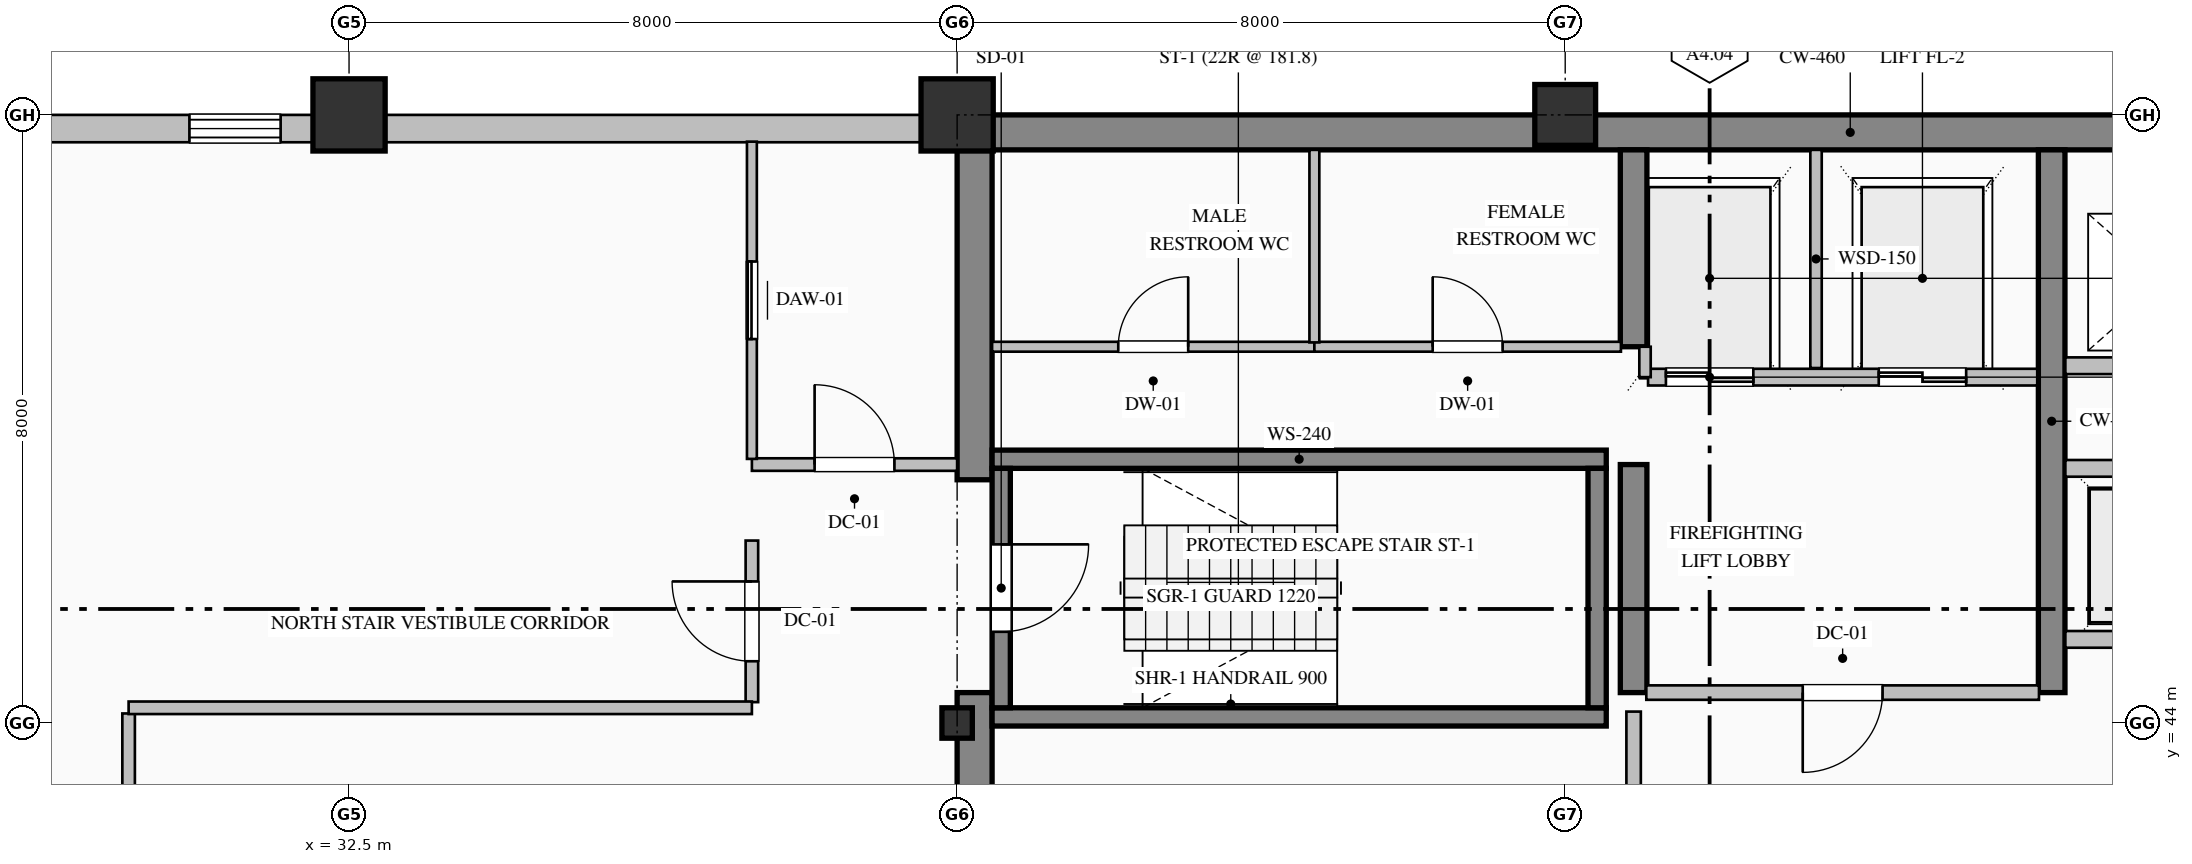
"""IFC4 building model, lengths in metres.
Left out: names, types, materials, properties, quantities, classifications, styles, units other than length and angle.
Written with IfcOpenShell. Run it as: python <this file> out.ifc"""

import sys

from ifc_helpers import new_model, si_unit, direction, frame, frame_2d, origin, origin_2d, place, context, subcontext, project, spatial, rectangle, hollow_rectangle, i_section, extrude, element, fill, save


model = new_model("IFC4")
c1 = context("Model", 3, precision=1e-05, world=origin(), true_north=direction((0.0, 1.0)))
c2 = subcontext(c1, "Body", "Model", "MODEL_VIEW")
j1 = project(units=[si_unit("LENGTHUNIT", "METRE"), si_unit("PLANEANGLEUNIT", "RADIAN")], contexts=[c1])
p1 = place(None, origin())
s1 = spatial("IfcSite", under=j1, at=p1, CompositionType="ELEMENT")
p2 = place(p1, origin())
s2 = spatial("IfcBuilding", under=s1, at=p2, CompositionType="ELEMENT")
p3 = place(p2, frame((0.0, 0.0, 249.8)))
s3 = spatial("IfcBuildingStorey", under=s2, at=p3, CompositionType="ELEMENT", Elevation=249.8)
p4 = place(p3, frame((40.5, 51.77, 0.0), z_axis=(0.0, 0.0, 1.0), x_axis=(1.0, 0.0, 0.0)))
e1 = element("IfcWall", 1, at=p4, inside=s3, PredefinedType="SHEAR", context=c2, shape_type="SweptSolid", body=[
    extrude(rectangle(XDim=23.5, YDim=0.46, at=frame_2d((11.75, 0.0))), origin(), (0.0, 0.0, 1.0), 3.775),
])
p5 = place(p3, frame((40.73, 36.46, 0.0), z_axis=(0.0, 0.0, 1.0), x_axis=(0.0, 1.0, 0.0)))
e2 = element("IfcWall", 2, at=p5, inside=s3, PredefinedType="SHEAR", context=c2, shape_type="SweptSolid", body=[
    extrude(rectangle(XDim=7.94, YDim=0.46, at=frame_2d((3.97, 0.0))), origin(), (0.0, 0.0, 1.0), 3.775),
])
p6 = place(p3, frame((40.73, 47.2, 0.0), z_axis=(0.0, 0.0, 1.0), x_axis=(0.0, 1.0, 0.0)))
e3 = element("IfcWall", 3, at=p6, inside=s3, PredefinedType="SHEAR", context=c2, shape_type="SweptSolid", body=[
    extrude(rectangle(XDim=4.34, YDim=0.46, at=frame_2d((2.17, 0.0))), origin(), (0.0, 0.0, 1.0), 3.775),
])
p7 = place(p3, frame((49.4, 44.4, 0.0), z_axis=(0.0, 0.0, 1.0), x_axis=(0.0, 1.0, 0.0)))
e4 = element("IfcWall", 4, at=p7, inside=s3, PredefinedType="SHEAR", context=c2, shape_type="SweptSolid", body=[
    extrude(rectangle(XDim=3.0, YDim=0.35, at=frame_2d((1.5, 0.0))), origin(), (0.0, 0.0, 1.0), 3.775),
])
p8 = place(p3, frame((49.4, 48.95, 0.0), z_axis=(0.0, 0.0, 1.0), x_axis=(0.0, 1.0, 0.0)))
e5 = element("IfcWall", 5, at=p8, inside=s3, PredefinedType="SHEAR", context=c2, shape_type="SweptSolid", body=[
    extrude(rectangle(XDim=2.59, YDim=0.35, at=frame_2d((1.295, 0.0))), origin(), (0.0, 0.0, 1.0), 3.775),
])
p9 = place(p3, frame((54.9, 44.4, 0.0), z_axis=(0.0, 0.0, 1.0), x_axis=(0.0, 1.0, 0.0)))
e6 = element("IfcWall", 6, at=p9, inside=s3, PredefinedType="SHEAR", context=c2, shape_type="SweptSolid", body=[
    extrude(rectangle(XDim=7.14, YDim=0.35, at=frame_2d((3.57, 0.0))), origin(), (0.0, 0.0, 1.0), 3.775),
])
p10 = place(p3, frame((32.5, 52.0, 0.0), z_axis=(0.0, 0.0, 1.0), x_axis=(1.0, 0.0, 0.0)))
e7 = element("IfcColumn", 7, at=p10, inside=s3, PredefinedType="COLUMN", context=c2, shape_type="SweptSolid", body=[
    extrude(hollow_rectangle(XDim=0.95, YDim=0.95, WallThickness=0.036, at=origin_2d()), origin(), (0.0, 0.0, 1.0), 4.0),
])
p11 = place(p3, frame((40.5, 44.0, 0.0), z_axis=(0.0, 0.0, 1.0), x_axis=(1.0, 0.0, 0.0)))
e8 = element("IfcColumn", 8, at=p11, inside=s3, PredefinedType="COLUMN", context=c2, shape_type="SweptSolid", body=[
    extrude(i_section(OverallWidth=0.4, OverallDepth=0.4, WebThickness=0.013, FlangeThickness=0.021, FilletRadius=0.022, at=origin_2d()), origin(), (0.0, 0.0, 1.0), 4.0),
])
p12 = place(p3, frame((40.5, 52.0, 0.0), z_axis=(0.0, 0.0, 1.0), x_axis=(1.0, 0.0, 0.0)))
e9 = element("IfcColumn", 9, at=p12, inside=s3, PredefinedType="COLUMN", context=c2, shape_type="SweptSolid", body=[
    extrude(hollow_rectangle(XDim=0.95, YDim=0.95, WallThickness=0.036, at=origin_2d()), origin(), (0.0, 0.0, 1.0), 4.0),
])
p13 = place(p3, frame((48.5, 52.0, 0.0), z_axis=(0.0, 0.0, 1.0), x_axis=(1.0, 0.0, 0.0)))
e10 = element("IfcColumn", 10, at=p13, inside=s3, PredefinedType="COLUMN", context=c2, shape_type="SweptSolid", body=[
    extrude(hollow_rectangle(XDim=0.8, YDim=0.8, WallThickness=0.032, at=origin_2d()), origin(), (0.0, 0.0, 1.0), 4.0),
])
p14 = place(p3, frame((13.0, 51.82, 0.0), z_axis=(0.0, 0.0, 1.0), x_axis=(1.0, 0.0, 0.0)))
e11 = element("IfcWall", 11, at=p14, inside=s3, PredefinedType="SOLIDWALL", context=c2, shape_type="SweptSolid", body=[
    extrude(rectangle(XDim=27.52, YDim=0.36, at=frame_2d((13.76, 0.0))), origin(), (0.0, 0.0, 1.0), 3.325),
])
p15 = place(p14, frame((6.6, 0.0, 0.9)))
e12 = element("IfcOpeningElement", 12, at=p15, cuts=e11, PredefinedType="OPENING", context=c2, shape_type="SweptSolid", body=[
    extrude(rectangle(XDim=1.2, YDim=1.85, at=frame_2d((0.6, 0.925))), frame((0.0, 0.19, 0.0), z_axis=(0.0, -1.0, 0.0), x_axis=(1.0, 0.0, 0.0)), (0.0, 0.0, 1.0), 0.38),
])
p16 = place(p14, frame((17.4, 0.0, 0.9)))
e13 = element("IfcOpeningElement", 13, at=p16, cuts=e11, PredefinedType="OPENING", context=c2, shape_type="SweptSolid", body=[
    extrude(rectangle(XDim=1.2, YDim=1.85, at=frame_2d((0.6, 0.925))), frame((0.0, 0.19, 0.0), z_axis=(0.0, -1.0, 0.0), x_axis=(1.0, 0.0, 0.0)), (0.0, 0.0, 1.0), 0.38),
])
for number, where, z_axis, x_axis in (
    (14, (40.96, 47.47, 0.0), (0.0, 0.0, 1.0), (1.0, 0.0, 0.0)),
    (15, (49.04, 44.08, 0.0), (0.0, 0.0, 1.0), (-1.0, 0.0, 0.0)),
):
    element("IfcWall", number, at=place(p3, frame(where, z_axis=z_axis, x_axis=x_axis)), inside=s3, PredefinedType="SOLIDWALL", context=c2, shape_type="SweptSolid", body=[
        extrude(rectangle(XDim=8.08, YDim=0.24, at=frame_2d((4.04, 0.0))), origin(), (0.0, 0.0, 1.0), 4.0),
    ])
p17 = place(p3, frame((41.08, 47.35, 0.0), z_axis=(0.0, 0.0, 1.0), x_axis=(0.0, -1.0, 0.0)))
e16 = element("IfcWall", 16, at=p17, inside=s3, PredefinedType="SOLIDWALL", context=c2, shape_type="SweptSolid", body=[
    extrude(rectangle(XDim=3.15, YDim=0.24, at=frame_2d((1.575, 0.0))), origin(), (0.0, 0.0, 1.0), 4.0),
])
p18 = place(p17, frame((1.0, 0.0, 0.0)))
e17 = element("IfcOpeningElement", 17, at=p18, cuts=e16, PredefinedType="OPENING", context=c2, shape_type="SweptSolid", body=[
    extrude(rectangle(XDim=1.15, YDim=2.2, at=frame_2d((0.575, 1.1))), frame((0.0, 0.13, 0.0), z_axis=(0.0, -1.0, 0.0), x_axis=(1.0, 0.0, 0.0)), (0.0, 0.0, 1.0), 0.26),
])
p19 = place(p3, frame((48.92, 44.2, 0.0), z_axis=(0.0, 0.0, 1.0), x_axis=(0.0, 1.0, 0.0)))
e18 = element("IfcWall", 18, at=p19, inside=s3, PredefinedType="SOLIDWALL", context=c2, shape_type="SweptSolid", body=[
    extrude(rectangle(XDim=3.15, YDim=0.24, at=frame_2d((1.575, 0.0))), origin(), (0.0, 0.0, 1.0), 4.0),
])
p20 = place(p3, frame((54.71, 48.55, 0.0), z_axis=(0.0, 0.0, 1.0), x_axis=(-1.0, 0.0, 0.0)))
e19 = element("IfcWall", 19, at=p20, inside=s3, PredefinedType="PARTITIONING", context=c2, shape_type="SweptSolid", body=[
    extrude(rectangle(XDim=5.12, YDim=0.22, at=frame_2d((2.56, 0.0))), origin(), (0.0, 0.0, 1.0), 3.775),
])
p21 = place(p20, frame((3.735, 0.0, 0.0)))
e20 = element("IfcOpeningElement", 20, at=p21, cuts=e19, PredefinedType="OPENING", context=c2, shape_type="SweptSolid", body=[
    extrude(rectangle(XDim=1.15, YDim=2.2, at=frame_2d((0.575, 1.1))), frame((0.0, 0.12, 0.0), z_axis=(0.0, -1.0, 0.0), x_axis=(1.0, 0.0, 0.0)), (0.0, 0.0, 1.0), 0.24),
])
p22 = place(p20, frame((0.935, 0.0, 0.0)))
e21 = element("IfcOpeningElement", 21, at=p22, cuts=e19, PredefinedType="OPENING", context=c2, shape_type="SweptSolid", body=[
    extrude(rectangle(XDim=1.15, YDim=2.2, at=frame_2d((0.575, 1.1))), frame((0.0, 0.12, 0.0), z_axis=(0.0, -1.0, 0.0), x_axis=(1.0, 0.0, 0.0)), (0.0, 0.0, 1.0), 0.24),
])
p23 = place(p3, frame((51.8, 48.67, 0.0), z_axis=(0.0, 0.0, 1.0), x_axis=(0.0, 1.0, 0.0)))
e22 = element("IfcWall", 22, at=p23, inside=s3, PredefinedType="PARTITIONING", context=c2, shape_type="SweptSolid", body=[
    extrude(rectangle(XDim=2.87, YDim=0.15, at=frame_2d((1.435, 0.0))), origin(), (0.0, 0.0, 1.0), 3.775),
])
p24 = place(p3, frame((49.55, 48.55, 0.0), z_axis=(0.0, 0.0, 1.0), x_axis=(0.0, 1.0, 0.0)))
e23 = element("IfcWall", 23, at=p24, inside=s3, PredefinedType="PARTITIONING", context=c2, shape_type="SweptSolid", body=[
    extrude(rectangle(XDim=0.4, YDim=0.15, at=frame_2d((0.2, 0.0))), origin(), (0.0, 0.0, 1.0), 3.775),
])
p25 = place(p3, frame((63.32, 45.1, 0.0), z_axis=(0.0, 0.0, 1.0), x_axis=(-1.0, 0.0, 0.0)))
e24 = element("IfcWall", 24, at=p25, inside=s3, PredefinedType="PARTITIONING", context=c2, shape_type="SweptSolid", body=[
    extrude(rectangle(XDim=8.24, YDim=0.22, at=frame_2d((4.12, 0.0))), origin(), (0.0, 0.0, 1.0), 3.775),
])
p26 = place(p25, frame((6.37, 0.0, 0.0)))
e25 = element("IfcOpeningElement", 25, at=p26, cuts=e24, PredefinedType="OPENING", context=c2, shape_type="SweptSolid", body=[
    extrude(rectangle(XDim=1.1, YDim=2.2, at=frame_2d((0.55, 1.1))), frame((0.0, 0.12, 0.0), z_axis=(0.0, -1.0, 0.0), x_axis=(1.0, 0.0, 0.0)), (0.0, 0.0, 1.0), 0.24),
])
p27 = place(p25, frame((3.57, 0.0, 0.0)))
e26 = element("IfcOpeningElement", 26, at=p27, cuts=e24, PredefinedType="OPENING", context=c2, shape_type="SweptSolid", body=[
    extrude(rectangle(XDim=1.1, YDim=2.2, at=frame_2d((0.55, 1.1))), frame((0.0, 0.12, 0.0), z_axis=(0.0, -1.0, 0.0), x_axis=(1.0, 0.0, 0.0)), (0.0, 0.0, 1.0), 0.24),
])
p28 = place(p25, frame((0.77, 0.0, 0.0)))
e27 = element("IfcOpeningElement", 27, at=p28, cuts=e24, PredefinedType="OPENING", context=c2, shape_type="SweptSolid", body=[
    extrude(rectangle(XDim=1.1, YDim=2.2, at=frame_2d((0.55, 1.1))), frame((0.0, 0.12, 0.0), z_axis=(0.0, -1.0, 0.0), x_axis=(1.0, 0.0, 0.0)), (0.0, 0.0, 1.0), 0.24),
])
for number, where, z_axis, x_axis in (
    (28, (55.08, 47.35, 0.0), (0.0, 0.0, 1.0), (1.0, 0.0, 0.0)),
    (29, (63.32, 48.7, 0.0), (0.0, 0.0, 1.0), (-1.0, 0.0, 0.0)),
):
    element("IfcWall", number, at=place(p3, frame(where, z_axis=z_axis, x_axis=x_axis)), inside=s3, PredefinedType="PARTITIONING", context=c2, shape_type="SweptSolid", body=[
        extrude(rectangle(XDim=8.24, YDim=0.22, at=frame_2d((4.12, 0.0))), origin(), (0.0, 0.0, 1.0), 3.775),
    ])
p29 = place(p3, frame((37.8, 47.4, 0.0), z_axis=(0.0, 0.0, 1.0), x_axis=(1.0, 0.0, 0.0)))
e30 = element("IfcWall", 30, at=p29, inside=s3, PredefinedType="PARTITIONING", context=c2, shape_type="SweptSolid", body=[
    extrude(rectangle(XDim=2.7, YDim=0.165, at=frame_2d((1.35, 0.0))), origin(), (0.0, 0.0, 1.0), 3.775),
])
p30 = place(p29, frame((0.825, 0.0, 0.0)))
e31 = element("IfcOpeningElement", 31, at=p30, cuts=e30, PredefinedType="OPENING", context=c2, shape_type="SweptSolid", body=[
    extrude(rectangle(XDim=1.05, YDim=2.15, at=frame_2d((0.525, 1.075))), frame((0.0, 0.093, 0.0), z_axis=(0.0, -1.0, 0.0), x_axis=(1.0, 0.0, 0.0)), (0.0, 0.0, 1.0), 0.185),
])
p31 = place(p3, frame((37.8, 44.274, 0.0), z_axis=(0.0, 0.0, 1.0), x_axis=(0.0, 1.0, 0.0)))
e32 = element("IfcWall", 32, at=p31, inside=s3, PredefinedType="PARTITIONING", context=c2, shape_type="SweptSolid", body=[
    extrude(rectangle(XDim=2.125, YDim=0.165, at=frame_2d((1.063, 0.0))), origin(), (0.0, 0.0, 1.0), 3.775),
])
p32 = place(p31, frame((0.538, 0.0, 0.0)))
e33 = element("IfcOpeningElement", 33, at=p32, cuts=e32, PredefinedType="OPENING", context=c2, shape_type="SweptSolid", body=[
    extrude(rectangle(XDim=1.05, YDim=2.15, at=frame_2d((0.525, 1.075))), frame((0.0, 0.093, 0.0), z_axis=(0.0, -1.0, 0.0), x_axis=(1.0, 0.0, 0.0)), (0.0, 0.0, 1.0), 0.185),
])
p33 = place(p3, frame((37.8, 47.475, 0.0), z_axis=(0.0, 0.0, 1.0), x_axis=(0.0, 1.0, 0.0)))
e34 = element("IfcWall", 34, at=p33, inside=s3, PredefinedType="PARTITIONING", context=c2, shape_type="SweptSolid", body=[
    extrude(rectangle(XDim=4.173, YDim=0.13, at=frame_2d((2.087, 0.0))), origin(), (0.0, 0.0, 1.0), 3.775),
])
p34 = place(p33, frame((1.577, 0.0, 0.0)))
e35 = element("IfcOpeningElement", 35, at=p34, cuts=e34, PredefinedType="OPENING", context=c2, shape_type="SweptSolid", body=[
    extrude(rectangle(XDim=1.02, YDim=2.15, at=frame_2d((0.51, 1.075))), frame((0.0, 0.075, 0.0), z_axis=(0.0, -1.0, 0.0), x_axis=(1.0, 0.0, 0.0)), (0.0, 0.0, 1.0), 0.15),
])
p35 = place(p3, frame((40.96, 48.95, 0.0), z_axis=(0.0, 0.0, 1.0), x_axis=(1.0, 0.0, 0.0)))
e36 = element("IfcWall", 36, at=p35, inside=s3, PredefinedType="PARTITIONING", context=c2, shape_type="SweptSolid", body=[
    extrude(rectangle(XDim=4.24, YDim=0.13, at=frame_2d((2.12, 0.0))), origin(), (0.0, 0.0, 1.0), 3.775),
])
p36 = place(p35, frame((1.66, 0.0, 0.0)))
e37 = element("IfcOpeningElement", 37, at=p36, cuts=e36, PredefinedType="OPENING", context=c2, shape_type="SweptSolid", body=[
    extrude(rectangle(XDim=0.92, YDim=2.15, at=frame_2d((0.46, 1.075))), frame((0.0, 0.075, 0.0), z_axis=(0.0, -1.0, 0.0), x_axis=(1.0, 0.0, 0.0)), (0.0, 0.0, 1.0), 0.15),
])
p37 = place(p3, frame((45.2, 48.95, 0.0), z_axis=(0.0, 0.0, 1.0), x_axis=(1.0, 0.0, 0.0)))
e38 = element("IfcWall", 38, at=p37, inside=s3, PredefinedType="PARTITIONING", context=c2, shape_type="SweptSolid", body=[
    extrude(rectangle(XDim=4.033, YDim=0.13, at=frame_2d((2.017, 0.0))), origin(), (0.0, 0.0, 1.0), 3.775),
])
p38 = place(p37, frame((1.556, 0.0, 0.0)))
e39 = element("IfcOpeningElement", 39, at=p38, cuts=e38, PredefinedType="OPENING", context=c2, shape_type="SweptSolid", body=[
    extrude(rectangle(XDim=0.92, YDim=2.15, at=frame_2d((0.46, 1.075))), frame((0.0, 0.075, 0.0), z_axis=(0.0, -1.0, 0.0), x_axis=(1.0, 0.0, 0.0)), (0.0, 0.0, 1.0), 0.15),
])
p39 = place(p3, frame((54.733, 44.4, 0.0), z_axis=(0.0, 0.0, 1.0), x_axis=(-1.0, 0.0, 0.0)))
e40 = element("IfcWall", 40, at=p39, inside=s3, PredefinedType="PARTITIONING", context=c2, shape_type="SweptSolid", body=[
    extrude(rectangle(XDim=5.166, YDim=0.19, at=frame_2d((2.583, 0.0))), origin(), (0.0, 0.0, 1.0), 3.775),
])
p40 = place(p39, frame((2.058, 0.0, 0.0)))
e41 = element("IfcOpeningElement", 41, at=p40, cuts=e40, PredefinedType="OPENING", context=c2, shape_type="SweptSolid", body=[
    extrude(rectangle(XDim=1.05, YDim=2.15, at=frame_2d((0.525, 1.075))), frame((0.0, 0.105, 0.0), z_axis=(0.0, -1.0, 0.0), x_axis=(1.0, 0.0, 0.0)), (0.0, 0.0, 1.0), 0.21),
])
p41 = place(p3, frame((49.4, 40.487, 0.0), z_axis=(0.0, 0.0, 1.0), x_axis=(0.0, 1.0, 0.0)))
e42 = element("IfcWall", 42, at=p41, inside=s3, PredefinedType="PARTITIONING", context=c2, shape_type="SweptSolid", body=[
    extrude(rectangle(XDim=3.663, YDim=0.19, at=frame_2d((1.832, 0.0))), origin(), (0.0, 0.0, 1.0), 3.017),
])
p42 = place(p41, frame((1.132, 0.0, 0.0)))
e43 = element("IfcOpeningElement", 43, at=p42, cuts=e42, PredefinedType="OPENING", context=c2, shape_type="SweptSolid", body=[
    extrude(rectangle(XDim=1.4, YDim=2.25, at=frame_2d((0.7, 1.125))), frame((0.0, 0.105, 0.0), z_axis=(0.0, -1.0, 0.0), x_axis=(1.0, 0.0, 0.0)), (0.0, 0.0, 1.0), 0.21),
])
p43 = place(p3, frame((45.2, 51.54, 0.0), z_axis=(0.0, 0.0, 1.0), x_axis=(0.0, -1.0, 0.0)))
e44 = element("IfcWall", 44, at=p43, inside=s3, PredefinedType="PARTITIONING", context=c2, shape_type="SweptSolid", body=[
    extrude(rectangle(XDim=2.533, YDim=0.13, at=frame_2d((1.267, 0.0))), origin(), (0.0, 0.0, 1.0), 3.775),
])
p44 = place(p3, frame((29.6, 44.125, 0.0), z_axis=(0.0, 0.0, 1.0), x_axis=(0.0, -1.0, 0.0)))
e45 = element("IfcWall", 45, at=p44, inside=s3, PredefinedType="PARTITIONING", context=c2, shape_type="SweptSolid", body=[
    extrude(rectangle(XDim=11.451, YDim=0.165, at=frame_2d((5.726, 0.0))), origin(), (0.0, 0.0, 1.0), 3.775),
])
p45 = place(p44, frame((5.226, 0.0, 0.0)))
e46 = element("IfcOpeningElement", 46, at=p45, cuts=e45, PredefinedType="OPENING", context=c2, shape_type="SweptSolid", body=[
    extrude(rectangle(XDim=1.0, YDim=2.15, at=frame_2d((0.5, 1.075))), frame((0.0, 0.093, 0.0), z_axis=(0.0, -1.0, 0.0), x_axis=(1.0, 0.0, 0.0)), (0.0, 0.0, 1.0), 0.185),
])
p46 = place(p3, frame((37.8, 44.2, 0.0), z_axis=(0.0, 0.0, 1.0), x_axis=(-1.0, 0.0, 0.0)))
e47 = element("IfcWall", 47, at=p46, inside=s3, PredefinedType="PARTITIONING", context=c2, shape_type="SweptSolid", body=[
    extrude(rectangle(XDim=8.2, YDim=0.165, at=frame_2d((4.1, 0.0))), origin(), (0.0, 0.0, 1.0), 3.775),
])
p47 = place(p16, origin())
e48 = element("IfcWindow", 48, at=p47, inside=s3, PartitioningType="DOUBLE_PANEL_VERTICAL", PredefinedType="WINDOW", context=c2, shape_type="SweptSolid", body=[
    extrude(rectangle(XDim=1.2, YDim=1.85, at=frame_2d((0.6, 0.925))), frame((0.0, 0.15, 0.0), z_axis=(0.0, -1.0, 0.0), x_axis=(1.0, 0.0, 0.0)), (0.0, 0.0, 1.0), 0.06),
])
fill(e13, e48)
p48 = place(p18, origin())
e49 = element("IfcDoor", 49, at=p48, inside=s3, OperationType="SINGLE_SWING_LEFT", PredefinedType="DOOR", context=c2, shape_type="SweptSolid", body=[
    extrude(rectangle(XDim=1.15, YDim=2.2, at=frame_2d((0.575, 1.1))), frame((0.0, 0.025, 0.0), z_axis=(0.0, -1.0, 0.0), x_axis=(1.0, 0.0, 0.0)), (0.0, 0.0, 1.0), 0.05),
])
fill(e17, e49)
p49 = place(p21, origin())
e50 = element("IfcDoor", 50, at=p49, inside=s3, OperationType="DOUBLE_DOOR_SLIDING", PredefinedType="DOOR", context=c2, shape_type="SweptSolid", body=[
    extrude(rectangle(XDim=1.15, YDim=2.2, at=frame_2d((0.575, 1.1))), frame((0.0, 0.025, 0.0), z_axis=(0.0, -1.0, 0.0), x_axis=(1.0, 0.0, 0.0)), (0.0, 0.0, 1.0), 0.05),
])
fill(e20, e50)
p50 = place(p22, origin())
e51 = element("IfcDoor", 51, at=p50, inside=s3, OperationType="DOUBLE_DOOR_SLIDING", PredefinedType="DOOR", context=c2, shape_type="SweptSolid", body=[
    extrude(rectangle(XDim=1.15, YDim=2.2, at=frame_2d((0.575, 1.1))), frame((0.0, 0.025, 0.0), z_axis=(0.0, -1.0, 0.0), x_axis=(1.0, 0.0, 0.0)), (0.0, 0.0, 1.0), 0.05),
])
fill(e21, e51)
p51 = place(p40, origin())
e52 = element("IfcDoor", 52, at=p51, inside=s3, OperationType="SINGLE_SWING_RIGHT", PredefinedType="DOOR", context=c2, shape_type="SweptSolid", body=[
    extrude(rectangle(XDim=1.05, YDim=2.15, at=frame_2d((0.525, 1.075))), frame((0.0, 0.025, 0.0), z_axis=(0.0, -1.0, 0.0), x_axis=(1.0, 0.0, 0.0)), (0.0, 0.0, 1.0), 0.05),
])
fill(e41, e52)
p52 = place(p30, origin())
e53 = element("IfcDoor", 53, at=p52, inside=s3, OperationType="SINGLE_SWING_LEFT", PredefinedType="DOOR", context=c2, shape_type="SweptSolid", body=[
    extrude(rectangle(XDim=1.05, YDim=2.15, at=frame_2d((0.525, 1.075))), frame((0.0, 0.025, 0.0), z_axis=(0.0, -1.0, 0.0), x_axis=(1.0, 0.0, 0.0)), (0.0, 0.0, 1.0), 0.05),
])
fill(e31, e53)
p53 = place(p32, origin())
e54 = element("IfcDoor", 54, at=p53, inside=s3, OperationType="SINGLE_SWING_RIGHT", PredefinedType="DOOR", context=c2, shape_type="SweptSolid", body=[
    extrude(rectangle(XDim=1.05, YDim=2.15, at=frame_2d((0.525, 1.075))), frame((0.0, 0.025, 0.0), z_axis=(0.0, -1.0, 0.0), x_axis=(1.0, 0.0, 0.0)), (0.0, 0.0, 1.0), 0.05),
])
fill(e33, e54)
p54 = place(p34, origin())
e55 = element("IfcDoor", 55, at=p54, inside=s3, OperationType="SLIDING_TO_LEFT", PredefinedType="DOOR", context=c2, shape_type="SweptSolid", body=[
    extrude(rectangle(XDim=1.02, YDim=2.15, at=frame_2d((0.51, 1.075))), frame((0.0, 0.025, 0.0), z_axis=(0.0, -1.0, 0.0), x_axis=(1.0, 0.0, 0.0)), (0.0, 0.0, 1.0), 0.05),
])
fill(e35, e55)
p55 = place(p36, origin())
e56 = element("IfcDoor", 56, at=p55, inside=s3, OperationType="SINGLE_SWING_RIGHT", PredefinedType="DOOR", context=c2, shape_type="SweptSolid", body=[
    extrude(rectangle(XDim=0.92, YDim=2.15, at=frame_2d((0.46, 1.075))), frame((0.0, 0.025, 0.0), z_axis=(0.0, -1.0, 0.0), x_axis=(1.0, 0.0, 0.0)), (0.0, 0.0, 1.0), 0.05),
])
fill(e37, e56)
p56 = place(p38, origin())
e57 = element("IfcDoor", 57, at=p56, inside=s3, OperationType="SINGLE_SWING_LEFT", PredefinedType="DOOR", context=c2, shape_type="SweptSolid", body=[
    extrude(rectangle(XDim=0.92, YDim=2.15, at=frame_2d((0.46, 1.075))), frame((0.0, 0.025, 0.0), z_axis=(0.0, -1.0, 0.0), x_axis=(1.0, 0.0, 0.0)), (0.0, 0.0, 1.0), 0.05),
])
fill(e39, e57)
save(model, sys.argv[1])
